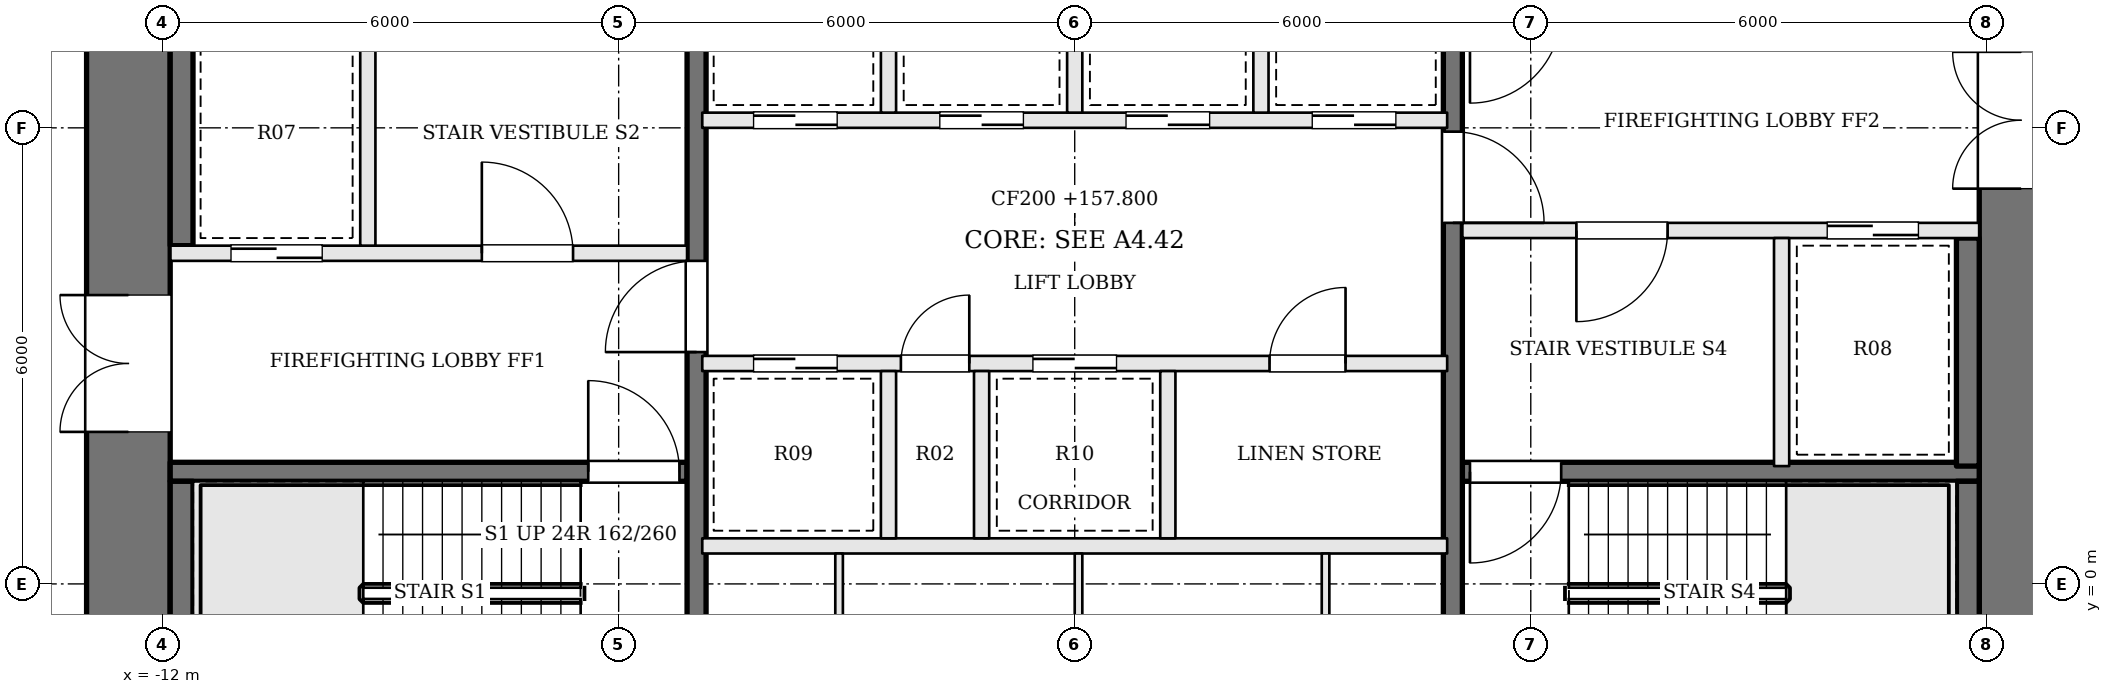
"""IFC4 building model, lengths in metres.
Left out: names, types, materials, properties, quantities, classifications, styles, units other than length and angle.
Written with IfcOpenShell. Run it as: python <this file> out.ifc"""

import sys

from ifc_helpers import new_model, si_unit, direction, frame, frame_2d, origin, place, context, subcontext, project, spatial, rectangle, extrude, element, fill, save


model = new_model("IFC4")
c1 = context("Model", 3, precision=1e-05, world=origin(), true_north=direction((0.0, 1.0)))
c2 = subcontext(c1, "Body", "Model", "MODEL_VIEW")
j1 = project(units=[si_unit("LENGTHUNIT", "METRE"), si_unit("PLANEANGLEUNIT", "RADIAN")], contexts=[c1])
p1 = place(None, origin())
s1 = spatial("IfcSite", under=j1, at=p1, CompositionType="ELEMENT")
p2 = place(p1, origin())
s2 = spatial("IfcBuilding", under=s1, at=p2, CompositionType="ELEMENT")
p3 = place(p2, frame((0.0, 0.0, 157.8)))
s3 = spatial("IfcBuildingStorey", under=s2, at=p3, CompositionType="ELEMENT", Elevation=157.8)
p4 = place(p3, frame((12.45, -1.9, 0.0), z_axis=(0.0, 0.0, 1.0), x_axis=(0.0, 1.0, 0.0)))
e1 = element("IfcWall", 1, at=p4, inside=s3, PredefinedType="SHEAR", context=c2, shape_type="SweptSolid", body=[
    extrude(rectangle(XDim=12.8, YDim=1.1, at=frame_2d((6.4, 0.0))), origin(), (0.0, 0.0, 1.0), 3.9),
])
p5 = place(p4, frame((7.1, 0.0, 0.0)))
e2 = element("IfcOpeningElement", 2, at=p5, cuts=e1, PredefinedType="OPENING", context=c2, shape_type="SweptSolid", body=[
    extrude(rectangle(XDim=1.8, YDim=2.1, at=frame_2d((0.9, 1.05))), frame((0.0, 0.56, 0.0), z_axis=(0.0, -1.0, 0.0), x_axis=(1.0, 0.0, 0.0)), (0.0, 0.0, 1.0), 1.12),
])
p6 = place(p3, frame((-12.45, -1.9, 0.0), z_axis=(0.0, 0.0, 1.0), x_axis=(0.0, 1.0, 0.0)))
e3 = element("IfcWall", 3, at=p6, inside=s3, PredefinedType="SHEAR", context=c2, shape_type="SweptSolid", body=[
    extrude(rectangle(XDim=12.8, YDim=1.1, at=frame_2d((6.4, 0.0))), origin(), (0.0, 0.0, 1.0), 3.9),
])
p7 = place(p6, frame((3.9, 0.0, 0.0)))
e4 = element("IfcOpeningElement", 4, at=p7, cuts=e3, PredefinedType="OPENING", context=c2, shape_type="SweptSolid", body=[
    extrude(rectangle(XDim=1.8, YDim=2.1, at=frame_2d((0.9, 1.05))), frame((0.0, 0.56, 0.0), z_axis=(0.0, -1.0, 0.0), x_axis=(1.0, 0.0, 0.0)), (0.0, 0.0, 1.0), 1.12),
])
p8 = place(p3, frame((-11.9, 1.475, 0.0), z_axis=(0.0, 0.0, 1.0), x_axis=(1.0, 0.0, 0.0)))
e5 = element("IfcWall", 5, at=p8, inside=s3, PredefinedType="SOLIDWALL", context=c2, shape_type="SweptSolid", body=[
    extrude(rectangle(XDim=6.8, YDim=0.25, at=frame_2d((3.4, 0.0))), origin(), (0.0, 0.0, 1.0), 3.7),
])
p9 = place(p8, frame((5.5, 0.0, 0.0)))
e6 = element("IfcOpeningElement", 6, at=p9, cuts=e5, PredefinedType="OPENING", context=c2, shape_type="SweptSolid", body=[
    extrude(rectangle(XDim=1.2, YDim=2.1, at=frame_2d((0.6, 1.05))), frame((0.0, 0.135, 0.0), z_axis=(0.0, -1.0, 0.0), x_axis=(1.0, 0.0, 0.0)), (0.0, 0.0, 1.0), 0.27),
])
p10 = place(p3, frame((-11.9, 4.35, 0.0), z_axis=(0.0, 0.0, 1.0), x_axis=(1.0, 0.0, 0.0)))
e7 = element("IfcWall", 7, at=p10, inside=s3, PredefinedType="SOLIDWALL", context=c2, shape_type="SweptSolid", body=[
    extrude(rectangle(XDim=6.8, YDim=0.2, at=frame_2d((3.4, 0.0))), origin(), (0.0, 0.0, 1.0), 3.7),
])
p11 = place(p10, frame((4.1, 0.0, 0.0)))
e8 = element("IfcOpeningElement", 8, at=p11, cuts=e7, PredefinedType="OPENING", context=c2, shape_type="SweptSolid", body=[
    extrude(rectangle(XDim=1.2, YDim=2.1, at=frame_2d((0.6, 1.05))), frame((0.0, 0.11, 0.0), z_axis=(0.0, -1.0, 0.0), x_axis=(1.0, 0.0, 0.0)), (0.0, 0.0, 1.0), 0.22),
])
p12 = place(p10, frame((0.8, 0.0, 0.0)))
e9 = element("IfcOpeningElement", 9, at=p12, cuts=e7, PredefinedType="OPENING", context=c2, shape_type="SweptSolid", body=[
    extrude(rectangle(XDim=1.2, YDim=2.1, at=frame_2d((0.6, 1.05))), frame((0.0, 0.11, 0.0), z_axis=(0.0, -1.0, 0.0), x_axis=(1.0, 0.0, 0.0)), (0.0, 0.0, 1.0), 0.22),
])
p13 = place(p3, frame((11.9, 4.65, 0.0), z_axis=(0.0, 0.0, 1.0), x_axis=(-1.0, 0.0, 0.0)))
e10 = element("IfcWall", 10, at=p13, inside=s3, PredefinedType="SOLIDWALL", context=c2, shape_type="SweptSolid", body=[
    extrude(rectangle(XDim=6.8, YDim=0.2, at=frame_2d((3.4, 0.0))), origin(), (0.0, 0.0, 1.0), 3.7),
])
p14 = place(p13, frame((4.1, 0.0, 0.0)))
e11 = element("IfcOpeningElement", 11, at=p14, cuts=e10, PredefinedType="OPENING", context=c2, shape_type="SweptSolid", body=[
    extrude(rectangle(XDim=1.2, YDim=2.1, at=frame_2d((0.6, 1.05))), frame((0.0, 0.11, 0.0), z_axis=(0.0, -1.0, 0.0), x_axis=(1.0, 0.0, 0.0)), (0.0, 0.0, 1.0), 0.22),
])
p15 = place(p13, frame((0.8, 0.0, 0.0)))
e12 = element("IfcOpeningElement", 12, at=p15, cuts=e10, PredefinedType="OPENING", context=c2, shape_type="SweptSolid", body=[
    extrude(rectangle(XDim=1.2, YDim=2.1, at=frame_2d((0.6, 1.05))), frame((0.0, 0.11, 0.0), z_axis=(0.0, -1.0, 0.0), x_axis=(1.0, 0.0, 0.0)), (0.0, 0.0, 1.0), 0.22),
])
p16 = place(p3, frame((11.9, 1.475, 0.0), z_axis=(0.0, 0.0, 1.0), x_axis=(-1.0, 0.0, 0.0)))
e13 = element("IfcWall", 13, at=p16, inside=s3, PredefinedType="SOLIDWALL", context=c2, shape_type="SweptSolid", body=[
    extrude(rectangle(XDim=6.8, YDim=0.25, at=frame_2d((3.4, 0.0))), origin(), (0.0, 0.0, 1.0), 3.7),
])
p17 = place(p16, frame((5.5, 0.0, 0.0)))
e14 = element("IfcOpeningElement", 14, at=p17, cuts=e13, PredefinedType="OPENING", context=c2, shape_type="SweptSolid", body=[
    extrude(rectangle(XDim=1.2, YDim=2.1, at=frame_2d((0.6, 1.05))), frame((0.0, 0.135, 0.0), z_axis=(0.0, -1.0, 0.0), x_axis=(1.0, 0.0, 0.0)), (0.0, 0.0, 1.0), 0.27),
])
for number, where, z_axis, x_axis in (
    (15, (-9.3, 4.45, 0.0), (0.0, 0.0, 1.0), (0.0, 1.0, 0.0)),
    (16, (9.3, 4.55, 0.0), (0.0, 0.0, 1.0), (0.0, -1.0, 0.0)),
):
    element("IfcWall", number, at=place(p3, frame(where, z_axis=z_axis, x_axis=x_axis)), inside=s3, PredefinedType="SOLIDWALL", context=c2, shape_type="SweptSolid", body=[
        extrude(rectangle(XDim=3.0, YDim=0.2, at=frame_2d((1.5, 0.0))), origin(), (0.0, 0.0, 1.0), 3.7),
    ])
p18 = place(p3, frame((-4.975, -1.9, 0.0), z_axis=(0.0, 0.0, 1.0), x_axis=(0.0, 1.0, 0.0)))
e17 = element("IfcWall", 17, at=p18, inside=s3, PredefinedType="SOLIDWALL", context=c2, shape_type="SweptSolid", body=[
    extrude(rectangle(XDim=12.8, YDim=0.25, at=frame_2d((6.4, 0.0))), origin(), (0.0, 0.0, 1.0), 3.7),
])
p19 = place(p18, frame((4.95, 0.0, 0.0)))
e18 = element("IfcOpeningElement", 18, at=p19, cuts=e17, PredefinedType="OPENING", context=c2, shape_type="SweptSolid", body=[
    extrude(rectangle(XDim=1.2, YDim=2.1, at=frame_2d((0.6, 1.05))), frame((0.0, 0.135, 0.0), z_axis=(0.0, -1.0, 0.0), x_axis=(1.0, 0.0, 0.0)), (0.0, 0.0, 1.0), 0.27),
])
p20 = place(p3, frame((4.975, 10.9, 0.0), z_axis=(0.0, 0.0, 1.0), x_axis=(0.0, -1.0, 0.0)))
e19 = element("IfcWall", 19, at=p20, inside=s3, PredefinedType="SOLIDWALL", context=c2, shape_type="SweptSolid", body=[
    extrude(rectangle(XDim=12.8, YDim=0.25, at=frame_2d((6.4, 0.0))), origin(), (0.0, 0.0, 1.0), 3.7),
])
p21 = place(p20, frame((4.95, 0.0, 0.0)))
e20 = element("IfcOpeningElement", 20, at=p21, cuts=e19, PredefinedType="OPENING", context=c2, shape_type="SweptSolid", body=[
    extrude(rectangle(XDim=1.2, YDim=2.1, at=frame_2d((0.6, 1.05))), frame((0.0, 0.135, 0.0), z_axis=(0.0, -1.0, 0.0), x_axis=(1.0, 0.0, 0.0)), (0.0, 0.0, 1.0), 0.27),
])
p22 = place(p3, frame((-11.75, -1.6, 0.0), z_axis=(0.0, 0.0, 1.0), x_axis=(0.0, 1.0, 0.0)))
e21 = element("IfcWall", 21, at=p22, inside=s3, PredefinedType="SOLIDWALL", context=c2, shape_type="SweptSolid", body=[
    extrude(rectangle(XDim=2.95, YDim=0.3, at=frame_2d((1.475, 0.0))), origin(), (0.0, 0.0, 1.0), 3.7),
])
for number, where, z_axis, x_axis in (
    (22, (-11.75, 4.45, 0.0), (0.0, 0.0, 1.0), (0.0, 1.0, 0.0)),
    (23, (11.75, 4.55, 0.0), (0.0, 0.0, 1.0), (0.0, -1.0, 0.0)),
):
    element("IfcWall", number, at=place(p3, frame(where, z_axis=z_axis, x_axis=x_axis)), inside=s3, PredefinedType="SOLIDWALL", context=c2, shape_type="SweptSolid", body=[
        extrude(rectangle(XDim=3.0, YDim=0.3, at=frame_2d((1.5, 0.0))), origin(), (0.0, 0.0, 1.0), 3.7),
    ])
p23 = place(p3, frame((11.75, 1.35, 0.0), z_axis=(0.0, 0.0, 1.0), x_axis=(0.0, -1.0, 0.0)))
e24 = element("IfcWall", 24, at=p23, inside=s3, PredefinedType="SOLIDWALL", context=c2, shape_type="SweptSolid", body=[
    extrude(rectangle(XDim=2.95, YDim=0.3, at=frame_2d((1.475, 0.0))), origin(), (0.0, 0.0, 1.0), 3.7),
])
p24 = place(p3, frame((-4.9, 0.5, 0.0), z_axis=(0.0, 0.0, 1.0), x_axis=(1.0, 0.0, 0.0)))
e25 = element("IfcWall", 25, at=p24, inside=s3, PredefinedType="SOLIDWALL", context=c2, shape_type="SweptSolid", body=[
    extrude(rectangle(XDim=9.8, YDim=0.2, at=frame_2d((4.9, 0.0))), origin(), (0.0, 0.0, 1.0), 3.7),
])
p25 = place(p3, frame((-4.9, 2.9, 0.0), z_axis=(0.0, 0.0, 1.0), x_axis=(1.0, 0.0, 0.0)))
e26 = element("IfcWall", 26, at=p25, inside=s3, PredefinedType="SOLIDWALL", context=c2, shape_type="SweptSolid", body=[
    extrude(rectangle(XDim=9.8, YDim=0.2, at=frame_2d((4.9, 0.0))), origin(), (0.0, 0.0, 1.0), 3.7),
])
p26 = place(p25, frame((0.675, 0.0, 0.0)))
e27 = element("IfcOpeningElement", 27, at=p26, cuts=e26, PredefinedType="OPENING", context=c2, shape_type="SweptSolid", body=[
    extrude(rectangle(XDim=1.1, YDim=2.1, at=frame_2d((0.55, 1.05))), frame((0.0, 0.11, 0.0), z_axis=(0.0, -1.0, 0.0), x_axis=(1.0, 0.0, 0.0)), (0.0, 0.0, 1.0), 0.22),
])
p27 = place(p25, frame((2.613, 0.0, 0.0)))
e28 = element("IfcOpeningElement", 28, at=p27, cuts=e26, PredefinedType="OPENING", context=c2, shape_type="SweptSolid", body=[
    extrude(rectangle(XDim=0.9, YDim=2.1, at=frame_2d((0.45, 1.05))), frame((0.0, 0.11, 0.0), z_axis=(0.0, -1.0, 0.0), x_axis=(1.0, 0.0, 0.0)), (0.0, 0.0, 1.0), 0.22),
])
p28 = place(p25, frame((4.35, 0.0, 0.0)))
e29 = element("IfcOpeningElement", 29, at=p28, cuts=e26, PredefinedType="OPENING", context=c2, shape_type="SweptSolid", body=[
    extrude(rectangle(XDim=1.1, YDim=2.1, at=frame_2d((0.55, 1.05))), frame((0.0, 0.11, 0.0), z_axis=(0.0, -1.0, 0.0), x_axis=(1.0, 0.0, 0.0)), (0.0, 0.0, 1.0), 0.22),
])
p29 = place(p25, frame((7.463, 0.0, 0.0)))
e30 = element("IfcOpeningElement", 30, at=p29, cuts=e26, PredefinedType="OPENING", context=c2, shape_type="SweptSolid", body=[
    extrude(rectangle(XDim=1.0, YDim=2.1, at=frame_2d((0.5, 1.05))), frame((0.0, 0.11, 0.0), z_axis=(0.0, -1.0, 0.0), x_axis=(1.0, 0.0, 0.0)), (0.0, 0.0, 1.0), 0.22),
])
p30 = place(p3, frame((-4.9, 6.1, 0.0), z_axis=(0.0, 0.0, 1.0), x_axis=(1.0, 0.0, 0.0)))
e31 = element("IfcWall", 31, at=p30, inside=s3, PredefinedType="SOLIDWALL", context=c2, shape_type="SweptSolid", body=[
    extrude(rectangle(XDim=9.8, YDim=0.2, at=frame_2d((4.9, 0.0))), origin(), (0.0, 0.0, 1.0), 3.7),
])
p31 = place(p30, frame((0.675, 0.0, 0.0)))
e32 = element("IfcOpeningElement", 32, at=p31, cuts=e31, PredefinedType="OPENING", context=c2, shape_type="SweptSolid", body=[
    extrude(rectangle(XDim=1.1, YDim=2.1, at=frame_2d((0.55, 1.05))), frame((0.0, 0.11, 0.0), z_axis=(0.0, -1.0, 0.0), x_axis=(1.0, 0.0, 0.0)), (0.0, 0.0, 1.0), 0.22),
])
p32 = place(p30, frame((3.125, 0.0, 0.0)))
e33 = element("IfcOpeningElement", 33, at=p32, cuts=e31, PredefinedType="OPENING", context=c2, shape_type="SweptSolid", body=[
    extrude(rectangle(XDim=1.1, YDim=2.1, at=frame_2d((0.55, 1.05))), frame((0.0, 0.11, 0.0), z_axis=(0.0, -1.0, 0.0), x_axis=(1.0, 0.0, 0.0)), (0.0, 0.0, 1.0), 0.22),
])
p33 = place(p30, frame((5.575, 0.0, 0.0)))
e34 = element("IfcOpeningElement", 34, at=p33, cuts=e31, PredefinedType="OPENING", context=c2, shape_type="SweptSolid", body=[
    extrude(rectangle(XDim=1.1, YDim=2.1, at=frame_2d((0.55, 1.05))), frame((0.0, 0.11, 0.0), z_axis=(0.0, -1.0, 0.0), x_axis=(1.0, 0.0, 0.0)), (0.0, 0.0, 1.0), 0.22),
])
p34 = place(p30, frame((8.025, 0.0, 0.0)))
e35 = element("IfcOpeningElement", 35, at=p34, cuts=e31, PredefinedType="OPENING", context=c2, shape_type="SweptSolid", body=[
    extrude(rectangle(XDim=1.1, YDim=2.1, at=frame_2d((0.55, 1.05))), frame((0.0, 0.11, 0.0), z_axis=(0.0, -1.0, 0.0), x_axis=(1.0, 0.0, 0.0)), (0.0, 0.0, 1.0), 0.22),
])
for number, where, z_axis, x_axis in (
    (36, (-2.45, 0.6, 0.0), (0.0, 0.0, 1.0), (0.0, 1.0, 0.0)),
    (37, (-1.225, 0.6, 0.0), (0.0, 0.0, 1.0), (0.0, 1.0, 0.0)),
    (38, (1.225, 0.6, 0.0), (0.0, 0.0, 1.0), (0.0, 1.0, 0.0)),
    (39, (-2.45, 6.2, 0.0), (0.0, 0.0, 1.0), (0.0, 1.0, 0.0)),
    (40, (0.0, 6.2, 0.0), (0.0, 0.0, 1.0), (0.0, 1.0, 0.0)),
    (41, (2.45, 6.2, 0.0), (0.0, 0.0, 1.0), (0.0, 1.0, 0.0)),
):
    element("IfcWall", number, at=place(p3, frame(where, z_axis=z_axis, x_axis=x_axis)), inside=s3, PredefinedType="SOLIDWALL", context=c2, shape_type="SweptSolid", body=[
        extrude(rectangle(XDim=2.2, YDim=0.2, at=frame_2d((1.1, 0.0))), origin(), (0.0, 0.0, 1.0), 3.7),
    ])
for number, where, z_axis, x_axis in (
    (42, (-3.1, -1.9, 0.0), (0.0, 0.0, 1.0), (0.0, 1.0, 0.0)),
    (43, (0.05, -1.9, 0.0), (0.0, 0.0, 1.0), (0.0, 1.0, 0.0)),
    (44, (3.3, -1.9, 0.0), (0.0, 0.0, 1.0), (0.0, 1.0, 0.0)),
):
    element("IfcWall", number, at=place(p3, frame(where, z_axis=z_axis, x_axis=x_axis)), inside=s3, PredefinedType="PARTITIONING", context=c2, shape_type="SweptSolid", body=[
        extrude(rectangle(XDim=2.3, YDim=0.1, at=frame_2d((1.15, 0.0))), origin(), (0.0, 0.0, 1.0), 3.7),
    ])
p35 = place(p7, origin())
e45 = element("IfcDoor", 45, at=p35, inside=s3, OperationType="DOUBLE_DOOR_SINGLE_SWING", PredefinedType="DOOR", context=c2, shape_type="SweptSolid", body=[
    extrude(rectangle(XDim=1.8, YDim=2.1, at=frame_2d((0.9, 1.05))), frame((0.0, 0.025, 0.0), z_axis=(0.0, -1.0, 0.0), x_axis=(1.0, 0.0, 0.0)), (0.0, 0.0, 1.0), 0.05),
])
fill(e4, e45)
p36 = place(p5, origin())
e46 = element("IfcDoor", 46, at=p36, inside=s3, OperationType="DOUBLE_DOOR_SINGLE_SWING", PredefinedType="DOOR", context=c2, shape_type="SweptSolid", body=[
    extrude(rectangle(XDim=1.8, YDim=2.1, at=frame_2d((0.9, 1.05))), frame((0.0, 0.025, 0.0), z_axis=(0.0, -1.0, 0.0), x_axis=(1.0, 0.0, 0.0)), (0.0, 0.0, 1.0), 0.05),
])
fill(e2, e46)
p37 = place(p19, origin())
e47 = element("IfcDoor", 47, at=p37, inside=s3, OperationType="SINGLE_SWING_LEFT", PredefinedType="DOOR", context=c2, shape_type="SweptSolid", body=[
    extrude(rectangle(XDim=1.2, YDim=2.1, at=frame_2d((0.6, 1.05))), frame((0.0, 0.025, 0.0), z_axis=(0.0, -1.0, 0.0), x_axis=(1.0, 0.0, 0.0)), (0.0, 0.0, 1.0), 0.05),
])
fill(e18, e47)
p38 = place(p21, origin())
e48 = element("IfcDoor", 48, at=p38, inside=s3, OperationType="SINGLE_SWING_RIGHT", PredefinedType="DOOR", context=c2, shape_type="SweptSolid", body=[
    extrude(rectangle(XDim=1.2, YDim=2.1, at=frame_2d((0.6, 1.05))), frame((0.0, 0.025, 0.0), z_axis=(0.0, -1.0, 0.0), x_axis=(1.0, 0.0, 0.0)), (0.0, 0.0, 1.0), 0.05),
])
fill(e20, e48)
p39 = place(p11, origin())
e49 = element("IfcDoor", 49, at=p39, inside=s3, OperationType="SINGLE_SWING_LEFT", PredefinedType="DOOR", context=c2, shape_type="SweptSolid", body=[
    extrude(rectangle(XDim=1.2, YDim=2.1, at=frame_2d((0.6, 1.05))), frame((0.0, 0.025, 0.0), z_axis=(0.0, -1.0, 0.0), x_axis=(1.0, 0.0, 0.0)), (0.0, 0.0, 1.0), 0.05),
])
fill(e8, e49)
p40 = place(p14, origin())
e50 = element("IfcDoor", 50, at=p40, inside=s3, OperationType="SINGLE_SWING_RIGHT", PredefinedType="DOOR", context=c2, shape_type="SweptSolid", body=[
    extrude(rectangle(XDim=1.2, YDim=2.1, at=frame_2d((0.6, 1.05))), frame((0.0, 0.025, 0.0), z_axis=(0.0, -1.0, 0.0), x_axis=(1.0, 0.0, 0.0)), (0.0, 0.0, 1.0), 0.05),
])
fill(e11, e50)
p41 = place(p9, origin())
e51 = element("IfcDoor", 51, at=p41, inside=s3, OperationType="SINGLE_SWING_LEFT", PredefinedType="DOOR", context=c2, shape_type="SweptSolid", body=[
    extrude(rectangle(XDim=1.2, YDim=2.1, at=frame_2d((0.6, 1.05))), frame((0.0, 0.025, 0.0), z_axis=(0.0, -1.0, 0.0), x_axis=(1.0, 0.0, 0.0)), (0.0, 0.0, 1.0), 0.05),
])
fill(e6, e51)
p42 = place(p17, origin())
e52 = element("IfcDoor", 52, at=p42, inside=s3, OperationType="SINGLE_SWING_RIGHT", PredefinedType="DOOR", context=c2, shape_type="SweptSolid", body=[
    extrude(rectangle(XDim=1.2, YDim=2.1, at=frame_2d((0.6, 1.05))), frame((0.0, 0.025, 0.0), z_axis=(0.0, -1.0, 0.0), x_axis=(1.0, 0.0, 0.0)), (0.0, 0.0, 1.0), 0.05),
])
fill(e14, e52)
p43 = place(p12, origin())
e53 = element("IfcDoor", 53, at=p43, inside=s3, OperationType="SLIDING_TO_RIGHT", PredefinedType="DOOR", context=c2, shape_type="SweptSolid", body=[
    extrude(rectangle(XDim=1.2, YDim=2.1, at=frame_2d((0.6, 1.05))), frame((0.0, 0.025, 0.0), z_axis=(0.0, -1.0, 0.0), x_axis=(1.0, 0.0, 0.0)), (0.0, 0.0, 1.0), 0.05),
])
fill(e9, e53)
p44 = place(p15, origin())
e54 = element("IfcDoor", 54, at=p44, inside=s3, OperationType="SLIDING_TO_RIGHT", PredefinedType="DOOR", context=c2, shape_type="SweptSolid", body=[
    extrude(rectangle(XDim=1.2, YDim=2.1, at=frame_2d((0.6, 1.05))), frame((0.0, 0.025, 0.0), z_axis=(0.0, -1.0, 0.0), x_axis=(1.0, 0.0, 0.0)), (0.0, 0.0, 1.0), 0.05),
])
fill(e12, e54)
p45 = place(p26, origin())
e55 = element("IfcDoor", 55, at=p45, inside=s3, OperationType="SLIDING_TO_RIGHT", PredefinedType="DOOR", context=c2, shape_type="SweptSolid", body=[
    extrude(rectangle(XDim=1.1, YDim=2.1, at=frame_2d((0.55, 1.05))), frame((0.0, 0.025, 0.0), z_axis=(0.0, -1.0, 0.0), x_axis=(1.0, 0.0, 0.0)), (0.0, 0.0, 1.0), 0.05),
])
fill(e27, e55)
p46 = place(p27, origin())
e56 = element("IfcDoor", 56, at=p46, inside=s3, OperationType="SINGLE_SWING_RIGHT", PredefinedType="DOOR", context=c2, shape_type="SweptSolid", body=[
    extrude(rectangle(XDim=0.9, YDim=2.1, at=frame_2d((0.45, 1.05))), frame((0.0, 0.025, 0.0), z_axis=(0.0, -1.0, 0.0), x_axis=(1.0, 0.0, 0.0)), (0.0, 0.0, 1.0), 0.05),
])
fill(e28, e56)
p47 = place(p28, origin())
e57 = element("IfcDoor", 57, at=p47, inside=s3, OperationType="SLIDING_TO_LEFT", PredefinedType="DOOR", context=c2, shape_type="SweptSolid", body=[
    extrude(rectangle(XDim=1.1, YDim=2.1, at=frame_2d((0.55, 1.05))), frame((0.0, 0.025, 0.0), z_axis=(0.0, -1.0, 0.0), x_axis=(1.0, 0.0, 0.0)), (0.0, 0.0, 1.0), 0.05),
])
fill(e29, e57)
p48 = place(p29, origin())
e58 = element("IfcDoor", 58, at=p48, inside=s3, OperationType="SINGLE_SWING_RIGHT", PredefinedType="DOOR", context=c2, shape_type="SweptSolid", body=[
    extrude(rectangle(XDim=1.0, YDim=2.1, at=frame_2d((0.5, 1.05))), frame((0.0, 0.025, 0.0), z_axis=(0.0, -1.0, 0.0), x_axis=(1.0, 0.0, 0.0)), (0.0, 0.0, 1.0), 0.05),
])
fill(e30, e58)
p49 = place(p31, origin())
e59 = element("IfcDoor", 59, at=p49, inside=s3, OperationType="SLIDING_TO_RIGHT", PredefinedType="DOOR", context=c2, shape_type="SweptSolid", body=[
    extrude(rectangle(XDim=1.1, YDim=2.1, at=frame_2d((0.55, 1.05))), frame((0.0, 0.025, 0.0), z_axis=(0.0, -1.0, 0.0), x_axis=(1.0, 0.0, 0.0)), (0.0, 0.0, 1.0), 0.05),
])
fill(e32, e59)
p50 = place(p32, origin())
e60 = element("IfcDoor", 60, at=p50, inside=s3, OperationType="SLIDING_TO_LEFT", PredefinedType="DOOR", context=c2, shape_type="SweptSolid", body=[
    extrude(rectangle(XDim=1.1, YDim=2.1, at=frame_2d((0.55, 1.05))), frame((0.0, 0.025, 0.0), z_axis=(0.0, -1.0, 0.0), x_axis=(1.0, 0.0, 0.0)), (0.0, 0.0, 1.0), 0.05),
])
fill(e33, e60)
p51 = place(p33, origin())
e61 = element("IfcDoor", 61, at=p51, inside=s3, OperationType="SLIDING_TO_RIGHT", PredefinedType="DOOR", context=c2, shape_type="SweptSolid", body=[
    extrude(rectangle(XDim=1.1, YDim=2.1, at=frame_2d((0.55, 1.05))), frame((0.0, 0.025, 0.0), z_axis=(0.0, -1.0, 0.0), x_axis=(1.0, 0.0, 0.0)), (0.0, 0.0, 1.0), 0.05),
])
fill(e34, e61)
p52 = place(p34, origin())
e62 = element("IfcDoor", 62, at=p52, inside=s3, OperationType="SLIDING_TO_LEFT", PredefinedType="DOOR", context=c2, shape_type="SweptSolid", body=[
    extrude(rectangle(XDim=1.1, YDim=2.1, at=frame_2d((0.55, 1.05))), frame((0.0, 0.025, 0.0), z_axis=(0.0, -1.0, 0.0), x_axis=(1.0, 0.0, 0.0)), (0.0, 0.0, 1.0), 0.05),
])
fill(e35, e62)
save(model, sys.argv[1])
